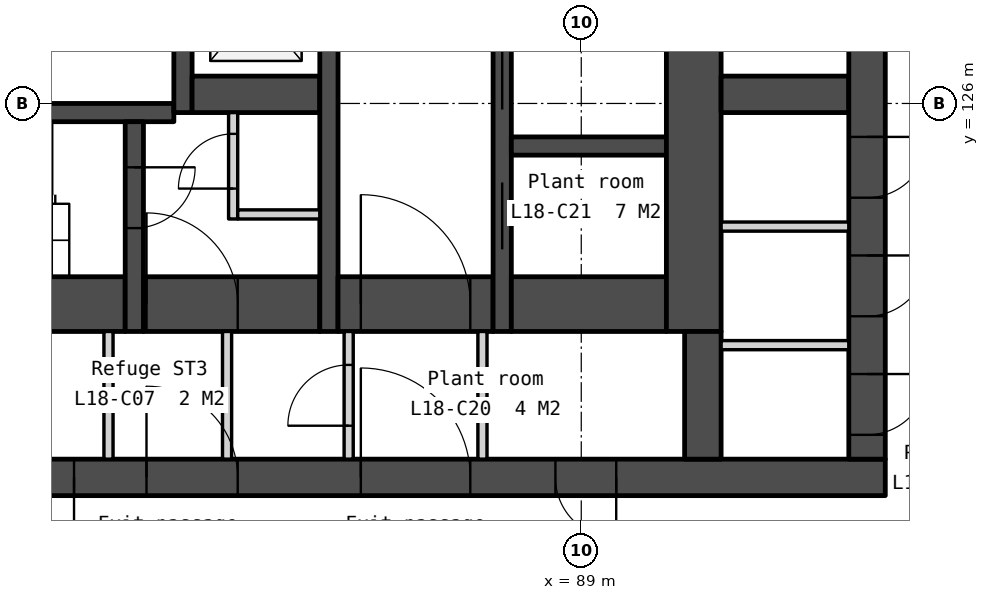
"""IFC4 building model, lengths in metres.
Left out: names, types, materials, properties, quantities, classifications, styles, units other than length and angle.
Written with IfcOpenShell. Run it as: python <this file> out.ifc"""

import sys

from ifc_helpers import new_model, si_unit, direction, frame, frame_2d, origin, place, context, subcontext, project, spatial, rectangle, extrude, element, fill, save


model = new_model("IFC4")
c1 = context("Model", 3, precision=1e-05, world=origin(), true_north=direction((0.0, 1.0)))
c2 = subcontext(c1, "Body", "Model", "MODEL_VIEW")
j1 = project(units=[si_unit("LENGTHUNIT", "METRE"), si_unit("PLANEANGLEUNIT", "RADIAN")], contexts=[c1])
p1 = place(None, origin())
s1 = spatial("IfcSite", under=j1, at=p1, CompositionType="ELEMENT")
p2 = place(p1, origin())
s2 = spatial("IfcBuilding", under=s1, at=p2, CompositionType="ELEMENT")
p3 = place(p2, frame((0.0, 0.0, 77.0)))
s3 = spatial("IfcBuildingStorey", under=s2, at=p3, CompositionType="ELEMENT", Elevation=77.0)
p4 = place(p3, frame((66.0, 119.85, 0.0), z_axis=(0.0, 0.0, 1.0), x_axis=(1.0, 0.0, 0.0)))
e1 = element("IfcWall", 1, at=p4, inside=s3, PredefinedType="SOLIDWALL", context=c2, shape_type="SweptSolid", body=[
    extrude(rectangle(XDim=28.0, YDim=0.6, at=frame_2d((14.0, 0.0))), origin(), (0.0, 0.0, 1.0), 4.35),
])
p5 = place(p4, frame((6.825, 0.0, 0.0)))
e2 = element("IfcOpeningElement", 2, at=p5, cuts=e1, PredefinedType="OPENING", context=c2, shape_type="SweptSolid", body=[
    extrude(rectangle(XDim=1.8, YDim=2.1, at=frame_2d((0.9, 1.05))), frame((0.0, 0.31, 0.0), z_axis=(0.0, -1.0, 0.0), x_axis=(1.0, 0.0, 0.0)), (0.0, 0.0, 1.0), 0.62),
])
p6 = place(p4, frame((15.85, 0.0, 0.0)))
e3 = element("IfcOpeningElement", 3, at=p6, cuts=e1, PredefinedType="OPENING", context=c2, shape_type="SweptSolid", body=[
    extrude(rectangle(XDim=1.5, YDim=2.1, at=frame_2d((0.75, 1.05))), frame((0.0, 0.31, 0.0), z_axis=(0.0, -1.0, 0.0), x_axis=(1.0, 0.0, 0.0)), (0.0, 0.0, 1.0), 0.62),
])
p7 = place(p4, frame((19.375, 0.0, 0.0)))
e4 = element("IfcOpeningElement", 4, at=p7, cuts=e1, PredefinedType="OPENING", context=c2, shape_type="SweptSolid", body=[
    extrude(rectangle(XDim=1.8, YDim=2.1, at=frame_2d((0.9, 1.05))), frame((0.0, 0.31, 0.0), z_axis=(0.0, -1.0, 0.0), x_axis=(1.0, 0.0, 0.0)), (0.0, 0.0, 1.0), 0.62),
])
p8 = place(p4, frame((4.425, 0.0, 0.0)))
e5 = element("IfcOpeningElement", 5, at=p8, cuts=e1, PredefinedType="OPENING", context=c2, shape_type="SweptSolid", body=[
    extrude(rectangle(XDim=1.0, YDim=2.1, at=frame_2d((0.5, 1.05))), frame((0.0, 0.31, 0.0), z_axis=(0.0, -1.0, 0.0), x_axis=(1.0, 0.0, 0.0)), (0.0, 0.0, 1.0), 0.62),
])
p9 = place(p4, frame((9.783, 0.0, 0.0)))
e6 = element("IfcOpeningElement", 6, at=p9, cuts=e1, PredefinedType="OPENING", context=c2, shape_type="SweptSolid", body=[
    extrude(rectangle(XDim=1.0, YDim=2.1, at=frame_2d((0.5, 1.05))), frame((0.0, 0.31, 0.0), z_axis=(0.0, -1.0, 0.0), x_axis=(1.0, 0.0, 0.0)), (0.0, 0.0, 1.0), 0.62),
])
p10 = place(p4, frame((11.525, 0.0, 0.0)))
e7 = element("IfcOpeningElement", 7, at=p10, cuts=e1, PredefinedType="OPENING", context=c2, shape_type="SweptSolid", body=[
    extrude(rectangle(XDim=1.0, YDim=2.1, at=frame_2d((0.5, 1.05))), frame((0.0, 0.31, 0.0), z_axis=(0.0, -1.0, 0.0), x_axis=(1.0, 0.0, 0.0)), (0.0, 0.0, 1.0), 0.62),
])
p11 = place(p4, frame((13.658, 0.0, 0.0)))
e8 = element("IfcOpeningElement", 8, at=p11, cuts=e1, PredefinedType="OPENING", context=c2, shape_type="SweptSolid", body=[
    extrude(rectangle(XDim=1.0, YDim=2.1, at=frame_2d((0.5, 1.05))), frame((0.0, 0.31, 0.0), z_axis=(0.0, -1.0, 0.0), x_axis=(1.0, 0.0, 0.0)), (0.0, 0.0, 1.0), 0.62),
])
p12 = place(p4, frame((22.575, 0.0, 0.0)))
e9 = element("IfcOpeningElement", 9, at=p12, cuts=e1, PredefinedType="OPENING", context=c2, shape_type="SweptSolid", body=[
    extrude(rectangle(XDim=1.0, YDim=2.1, at=frame_2d((0.5, 1.05))), frame((0.0, 0.31, 0.0), z_axis=(0.0, -1.0, 0.0), x_axis=(1.0, 0.0, 0.0)), (0.0, 0.0, 1.0), 0.62),
])
p13 = place(p3, frame((75.3, 122.7, 0.0), z_axis=(0.0, 0.0, 1.0), x_axis=(1.0, 0.0, 0.0)))
e10 = element("IfcWall", 10, at=p13, inside=s3, PredefinedType="SOLIDWALL", context=c2, shape_type="SweptSolid", body=[
    extrude(rectangle(XDim=6.2, YDim=0.9, at=frame_2d((3.1, 0.0))), origin(), (0.0, 0.0, 1.0), 4.35),
])
p14 = place(p3, frame((77.7, 125.85, 0.0), z_axis=(0.0, 0.0, 1.0), x_axis=(1.0, 0.0, 0.0)))
e11 = element("IfcWall", 11, at=p14, inside=s3, PredefinedType="SOLIDWALL", context=c2, shape_type="SweptSolid", body=[
    extrude(rectangle(XDim=4.6, YDim=0.3, at=frame_2d((2.3, 0.0))), origin(), (0.0, 0.0, 1.0), 4.35),
])
p15 = place(p3, frame((81.225, 122.25, 0.0), z_axis=(0.0, 0.0, 1.0), x_axis=(0.0, -1.0, 0.0)))
e12 = element("IfcWall", 12, at=p15, inside=s3, PredefinedType="PARTITIONING", context=c2, shape_type="SweptSolid", body=[
    extrude(rectangle(XDim=2.1, YDim=0.15, at=frame_2d((1.05, 0.0))), origin(), (0.0, 0.0, 1.0), 4.35),
])
p16 = place(p3, frame((81.65, 125.7, 0.0), z_axis=(0.0, 0.0, 1.0), x_axis=(0.0, -1.0, 0.0)))
e13 = element("IfcWall", 13, at=p16, inside=s3, PredefinedType="SOLIDWALL", context=c2, shape_type="SweptSolid", body=[
    extrude(rectangle(XDim=3.45, YDim=0.3, at=frame_2d((1.725, 0.0))), origin(), (0.0, 0.0, 1.0), 4.35),
])
p17 = place(p16, frame((0.75, 0.0, 0.0)))
e14 = element("IfcOpeningElement", 14, at=p17, cuts=e13, PredefinedType="OPENING", context=c2, shape_type="SweptSolid", body=[
    extrude(rectangle(XDim=1.0, YDim=2.1, at=frame_2d((0.5, 1.05))), frame((0.0, 0.16, 0.0), z_axis=(0.0, -1.0, 0.0), x_axis=(1.0, 0.0, 0.0)), (0.0, 0.0, 1.0), 0.32),
])
p18 = place(p3, frame((81.8, 122.7, 0.0), z_axis=(0.0, 0.0, 1.0), x_axis=(1.0, 0.0, 0.0)))
e15 = element("IfcWall", 15, at=p18, inside=s3, PredefinedType="SOLIDWALL", context=c2, shape_type="SweptSolid", body=[
    extrude(rectangle(XDim=2.9, YDim=0.9, at=frame_2d((1.45, 0.0))), origin(), (0.0, 0.0, 1.0), 4.35),
])
p19 = place(p18, frame((0.05, 0.0, 0.0)))
e16 = element("IfcOpeningElement", 16, at=p19, cuts=e15, PredefinedType="OPENING", context=c2, shape_type="SweptSolid", body=[
    extrude(rectangle(XDim=1.5, YDim=2.1, at=frame_2d((0.75, 1.05))), frame((0.0, 0.46, 0.0), z_axis=(0.0, -1.0, 0.0), x_axis=(1.0, 0.0, 0.0)), (0.0, 0.0, 1.0), 0.92),
])
p20 = place(p3, frame((82.45, 133.95, 0.0), z_axis=(0.0, 0.0, 1.0), x_axis=(0.0, -1.0, 0.0)))
e17 = element("IfcWall", 17, at=p20, inside=s3, PredefinedType="SOLIDWALL", context=c2, shape_type="SweptSolid", body=[
    extrude(rectangle(XDim=8.1, YDim=0.3, at=frame_2d((4.05, 0.0))), origin(), (0.0, 0.0, 1.0), 4.35),
])
p21 = place(p20, frame((0.6, 0.0, 0.0)))
e18 = element("IfcOpeningElement", 18, at=p21, cuts=e17, PredefinedType="OPENING", context=c2, shape_type="SweptSolid", body=[
    extrude(rectangle(XDim=1.1, YDim=2.1, at=frame_2d((0.55, 1.05))), frame((0.0, 0.16, 0.0), z_axis=(0.0, -1.0, 0.0), x_axis=(1.0, 0.0, 0.0)), (0.0, 0.0, 1.0), 0.32),
])
p22 = place(p20, frame((3.2, 0.0, 0.0)))
e19 = element("IfcOpeningElement", 19, at=p22, cuts=e17, PredefinedType="OPENING", context=c2, shape_type="SweptSolid", body=[
    extrude(rectangle(XDim=1.1, YDim=2.1, at=frame_2d((0.55, 1.05))), frame((0.0, 0.16, 0.0), z_axis=(0.0, -1.0, 0.0), x_axis=(1.0, 0.0, 0.0)), (0.0, 0.0, 1.0), 0.32),
])
p23 = place(p20, frame((5.8, 0.0, 0.0)))
e20 = element("IfcOpeningElement", 20, at=p23, cuts=e17, PredefinedType="OPENING", context=c2, shape_type="SweptSolid", body=[
    extrude(rectangle(XDim=1.1, YDim=2.1, at=frame_2d((0.55, 1.05))), frame((0.0, 0.16, 0.0), z_axis=(0.0, -1.0, 0.0), x_axis=(1.0, 0.0, 0.0)), (0.0, 0.0, 1.0), 0.32),
])
p24 = place(p3, frame((82.6, 126.15, 0.0), z_axis=(0.0, 0.0, 1.0), x_axis=(1.0, 0.0, 0.0)))
e21 = element("IfcWall", 21, at=p24, inside=s3, PredefinedType="SOLIDWALL", context=c2, shape_type="SweptSolid", body=[
    extrude(rectangle(XDim=2.1, YDim=0.6, at=frame_2d((1.05, 0.0))), origin(), (0.0, 0.0, 1.0), 4.35),
])
p25 = place(p3, frame((83.175, 122.25, 0.0), z_axis=(0.0, 0.0, 1.0), x_axis=(0.0, -1.0, 0.0)))
e22 = element("IfcWall", 22, at=p25, inside=s3, PredefinedType="PARTITIONING", context=c2, shape_type="SweptSolid", body=[
    extrude(rectangle(XDim=2.1, YDim=0.15, at=frame_2d((1.05, 0.0))), origin(), (0.0, 0.0, 1.0), 4.35),
])
p26 = place(p3, frame((83.275, 125.85, 0.0), z_axis=(0.0, 0.0, 1.0), x_axis=(0.0, -1.0, 0.0)))
e23 = element("IfcWall", 23, at=p26, inside=s3, PredefinedType="PARTITIONING", context=c2, shape_type="SweptSolid", body=[
    extrude(rectangle(XDim=1.75, YDim=0.15, at=frame_2d((0.875, 0.0))), origin(), (0.0, 0.0, 1.0), 4.35),
])
p27 = place(p26, frame((0.35, 0.0, 0.0)))
e24 = element("IfcOpeningElement", 24, at=p27, cuts=e23, PredefinedType="OPENING", context=c2, shape_type="SweptSolid", body=[
    extrude(rectangle(XDim=0.9, YDim=2.1, at=frame_2d((0.45, 1.05))), frame((0.0, 0.085, 0.0), z_axis=(0.0, -1.0, 0.0), x_axis=(1.0, 0.0, 0.0)), (0.0, 0.0, 1.0), 0.17),
])
p28 = place(p3, frame((83.35, 124.175, 0.0), z_axis=(0.0, 0.0, 1.0), x_axis=(1.0, 0.0, 0.0)))
e25 = element("IfcWall", 25, at=p28, inside=s3, PredefinedType="PARTITIONING", context=c2, shape_type="SweptSolid", body=[
    extrude(rectangle(XDim=1.35, YDim=0.15, at=frame_2d((0.675, 0.0))), origin(), (0.0, 0.0, 1.0), 4.35),
])
p29 = place(p3, frame((84.85, 133.95, 0.0), z_axis=(0.0, 0.0, 1.0), x_axis=(0.0, -1.0, 0.0)))
e26 = element("IfcWall", 26, at=p29, inside=s3, PredefinedType="SOLIDWALL", context=c2, shape_type="SweptSolid", body=[
    extrude(rectangle(XDim=11.7, YDim=0.3, at=frame_2d((5.85, 0.0))), origin(), (0.0, 0.0, 1.0), 4.35),
])
p30 = place(p3, frame((85.0, 122.7, 0.0), z_axis=(0.0, 0.0, 1.0), x_axis=(1.0, 0.0, 0.0)))
e27 = element("IfcWall", 27, at=p30, inside=s3, PredefinedType="SOLIDWALL", context=c2, shape_type="SweptSolid", body=[
    extrude(rectangle(XDim=2.55, YDim=0.9, at=frame_2d((1.275, 0.0))), origin(), (0.0, 0.0, 1.0), 4.35),
])
p31 = place(p30, frame((0.375, 0.0, 0.0)))
e28 = element("IfcOpeningElement", 28, at=p31, cuts=e27, PredefinedType="OPENING", context=c2, shape_type="SweptSolid", body=[
    extrude(rectangle(XDim=1.8, YDim=2.1, at=frame_2d((0.9, 1.05))), frame((0.0, 0.46, 0.0), z_axis=(0.0, -1.0, 0.0), x_axis=(1.0, 0.0, 0.0)), (0.0, 0.0, 1.0), 0.92),
])
p32 = place(p3, frame((85.175, 122.25, 0.0), z_axis=(0.0, 0.0, 1.0), x_axis=(0.0, -1.0, 0.0)))
e29 = element("IfcWall", 29, at=p32, inside=s3, PredefinedType="PARTITIONING", context=c2, shape_type="SweptSolid", body=[
    extrude(rectangle(XDim=2.1, YDim=0.15, at=frame_2d((1.05, 0.0))), origin(), (0.0, 0.0, 1.0), 4.35),
])
p33 = place(p32, frame((0.55, 0.0, 0.0)))
e30 = element("IfcOpeningElement", 30, at=p33, cuts=e29, PredefinedType="OPENING", context=c2, shape_type="SweptSolid", body=[
    extrude(rectangle(XDim=1.0, YDim=2.1, at=frame_2d((0.5, 1.05))), frame((0.0, 0.085, 0.0), z_axis=(0.0, -1.0, 0.0), x_axis=(1.0, 0.0, 0.0)), (0.0, 0.0, 1.0), 0.17),
])
p34 = place(p3, frame((87.375, 122.25, 0.0), z_axis=(0.0, 0.0, 1.0), x_axis=(0.0, -1.0, 0.0)))
e31 = element("IfcWall", 31, at=p34, inside=s3, PredefinedType="PARTITIONING", context=c2, shape_type="SweptSolid", body=[
    extrude(rectangle(XDim=2.1, YDim=0.15, at=frame_2d((1.05, 0.0))), origin(), (0.0, 0.0, 1.0), 4.35),
])
p35 = place(p3, frame((87.7, 133.95, 0.0), z_axis=(0.0, 0.0, 1.0), x_axis=(0.0, -1.0, 0.0)))
e32 = element("IfcWall", 32, at=p35, inside=s3, PredefinedType="SOLIDWALL", context=c2, shape_type="SweptSolid", body=[
    extrude(rectangle(XDim=11.7, YDim=0.3, at=frame_2d((5.85, 0.0))), origin(), (0.0, 0.0, 1.0), 4.35),
])
p36 = place(p35, frame((6.95, 0.0, 0.0)))
e33 = element("IfcOpeningElement", 33, at=p36, cuts=e32, PredefinedType="OPENING", context=c2, shape_type="SweptSolid", body=[
    extrude(rectangle(XDim=1.1, YDim=2.1, at=frame_2d((0.55, 1.05))), frame((0.0, 0.16, 0.0), z_axis=(0.0, -1.0, 0.0), x_axis=(1.0, 0.0, 0.0)), (0.0, 0.0, 1.0), 0.32),
])
p37 = place(p35, frame((5.1, 0.0, 0.0)))
e34 = element("IfcOpeningElement", 34, at=p37, cuts=e32, PredefinedType="OPENING", context=c2, shape_type="SweptSolid", body=[
    extrude(rectangle(XDim=1.0, YDim=2.1, at=frame_2d((0.5, 1.05))), frame((0.0, 0.16, 0.0), z_axis=(0.0, -1.0, 0.0), x_axis=(1.0, 0.0, 0.0)), (0.0, 0.0, 1.0), 0.32),
])
p38 = place(p35, frame((9.25, 0.0, 0.0)))
e35 = element("IfcOpeningElement", 35, at=p38, cuts=e32, PredefinedType="OPENING", context=c2, shape_type="SweptSolid", body=[
    extrude(rectangle(XDim=1.1, YDim=2.1, at=frame_2d((0.55, 1.05))), frame((0.0, 0.16, 0.0), z_axis=(0.0, -1.0, 0.0), x_axis=(1.0, 0.0, 0.0)), (0.0, 0.0, 1.0), 0.32),
])
p39 = place(p3, frame((87.85, 125.3, 0.0), z_axis=(0.0, 0.0, 1.0), x_axis=(1.0, 0.0, 0.0)))
e36 = element("IfcWall", 36, at=p39, inside=s3, PredefinedType="SOLIDWALL", context=c2, shape_type="SweptSolid", body=[
    extrude(rectangle(XDim=2.55, YDim=0.3, at=frame_2d((1.275, 0.0))), origin(), (0.0, 0.0, 1.0), 4.35),
])
p40 = place(p3, frame((87.85, 122.7, 0.0), z_axis=(0.0, 0.0, 1.0), x_axis=(1.0, 0.0, 0.0)))
e37 = element("IfcWall", 37, at=p40, inside=s3, PredefinedType="SOLIDWALL", context=c2, shape_type="SweptSolid", body=[
    extrude(rectangle(XDim=2.55, YDim=0.9, at=frame_2d((1.275, 0.0))), origin(), (0.0, 0.0, 1.0), 4.35),
])
p41 = place(p3, frame((90.85, 133.95, 0.0), z_axis=(0.0, 0.0, 1.0), x_axis=(0.0, -1.0, 0.0)))
e38 = element("IfcWall", 38, at=p41, inside=s3, PredefinedType="SOLIDWALL", context=c2, shape_type="SweptSolid", body=[
    extrude(rectangle(XDim=11.7, YDim=0.9, at=frame_2d((5.85, 0.0))), origin(), (0.0, 0.0, 1.0), 4.35),
])
p42 = place(p3, frame((91.0, 122.25, 0.0), z_axis=(0.0, 0.0, 1.0), x_axis=(0.0, -1.0, 0.0)))
e39 = element("IfcWall", 39, at=p42, inside=s3, PredefinedType="SOLIDWALL", context=c2, shape_type="SweptSolid", body=[
    extrude(rectangle(XDim=2.1, YDim=0.6, at=frame_2d((1.05, 0.0))), origin(), (0.0, 0.0, 1.0), 4.35),
])
p43 = place(p3, frame((91.3, 126.15, 0.0), z_axis=(0.0, 0.0, 1.0), x_axis=(1.0, 0.0, 0.0)))
e40 = element("IfcWall", 40, at=p43, inside=s3, PredefinedType="SOLIDWALL", context=c2, shape_type="SweptSolid", body=[
    extrude(rectangle(XDim=2.1, YDim=0.6, at=frame_2d((1.05, 0.0))), origin(), (0.0, 0.0, 1.0), 4.35),
])
for number, where, z_axis, x_axis in (
    (41, (91.3, 123.975, 0.0), (0.0, 0.0, 1.0), (1.0, 0.0, 0.0)),
    (42, (91.3, 122.025, 0.0), (0.0, 0.0, 1.0), (1.0, 0.0, 0.0)),
):
    element("IfcWall", number, at=place(p3, frame(where, z_axis=z_axis, x_axis=x_axis)), inside=s3, PredefinedType="PARTITIONING", context=c2, shape_type="SweptSolid", body=[
        extrude(rectangle(XDim=2.1, YDim=0.15, at=frame_2d((1.05, 0.0))), origin(), (0.0, 0.0, 1.0), 4.35),
    ])
p44 = place(p3, frame((93.7, 133.95, 0.0), z_axis=(0.0, 0.0, 1.0), x_axis=(0.0, -1.0, 0.0)))
e43 = element("IfcWall", 43, at=p44, inside=s3, PredefinedType="SOLIDWALL", context=c2, shape_type="SweptSolid", body=[
    extrude(rectangle(XDim=13.8, YDim=0.6, at=frame_2d((6.9, 0.0))), origin(), (0.0, 0.0, 1.0), 4.35),
])
p45 = place(p44, frame((0.6, 0.0, 0.0)))
e44 = element("IfcOpeningElement", 44, at=p45, cuts=e43, PredefinedType="OPENING", context=c2, shape_type="SweptSolid", body=[
    extrude(rectangle(XDim=1.1, YDim=2.1, at=frame_2d((0.55, 1.05))), frame((0.0, 0.31, 0.0), z_axis=(0.0, -1.0, 0.0), x_axis=(1.0, 0.0, 0.0)), (0.0, 0.0, 1.0), 0.62),
])
p46 = place(p44, frame((12.4, 0.0, 0.0)))
e45 = element("IfcOpeningElement", 45, at=p46, cuts=e43, PredefinedType="OPENING", context=c2, shape_type="SweptSolid", body=[
    extrude(rectangle(XDim=1.0, YDim=2.1, at=frame_2d((0.5, 1.05))), frame((0.0, 0.31, 0.0), z_axis=(0.0, -1.0, 0.0), x_axis=(1.0, 0.0, 0.0)), (0.0, 0.0, 1.0), 0.62),
])
p47 = place(p44, frame((8.5, 0.0, 0.0)))
e46 = element("IfcOpeningElement", 46, at=p47, cuts=e43, PredefinedType="OPENING", context=c2, shape_type="SweptSolid", body=[
    extrude(rectangle(XDim=1.0, YDim=2.1, at=frame_2d((0.5, 1.05))), frame((0.0, 0.31, 0.0), z_axis=(0.0, -1.0, 0.0), x_axis=(1.0, 0.0, 0.0)), (0.0, 0.0, 1.0), 0.62),
])
p48 = place(p44, frame((10.45, 0.0, 0.0)))
e47 = element("IfcOpeningElement", 47, at=p48, cuts=e43, PredefinedType="OPENING", context=c2, shape_type="SweptSolid", body=[
    extrude(rectangle(XDim=1.0, YDim=2.1, at=frame_2d((0.5, 1.05))), frame((0.0, 0.31, 0.0), z_axis=(0.0, -1.0, 0.0), x_axis=(1.0, 0.0, 0.0)), (0.0, 0.0, 1.0), 0.62),
])
p49 = place(p46, origin())
e48 = element("IfcDoor", 48, at=p49, inside=s3, OperationType="SINGLE_SWING_LEFT", PredefinedType="DOOR", context=c2, shape_type="SweptSolid", body=[
    extrude(rectangle(XDim=1.0, YDim=2.1, at=frame_2d((0.5, 1.05))), frame((0.0, 0.025, 0.0), z_axis=(0.0, -1.0, 0.0), x_axis=(1.0, 0.0, 0.0)), (0.0, 0.0, 1.0), 0.05),
])
fill(e45, e48)
p50 = place(p47, origin())
e49 = element("IfcDoor", 49, at=p50, inside=s3, OperationType="SINGLE_SWING_LEFT", PredefinedType="DOOR", context=c2, shape_type="SweptSolid", body=[
    extrude(rectangle(XDim=1.0, YDim=2.1, at=frame_2d((0.5, 1.05))), frame((0.0, 0.025, 0.0), z_axis=(0.0, -1.0, 0.0), x_axis=(1.0, 0.0, 0.0)), (0.0, 0.0, 1.0), 0.05),
])
fill(e46, e49)
p51 = place(p48, origin())
e50 = element("IfcDoor", 50, at=p51, inside=s3, OperationType="SINGLE_SWING_LEFT", PredefinedType="DOOR", context=c2, shape_type="SweptSolid", body=[
    extrude(rectangle(XDim=1.0, YDim=2.1, at=frame_2d((0.5, 1.05))), frame((0.0, 0.025, 0.0), z_axis=(0.0, -1.0, 0.0), x_axis=(1.0, 0.0, 0.0)), (0.0, 0.0, 1.0), 0.05),
])
fill(e47, e50)
p52 = place(p36, origin())
e51 = element("IfcDoor", 51, at=p52, inside=s3, OperationType="SLIDING_TO_LEFT", PredefinedType="DOOR", context=c2, shape_type="SweptSolid", body=[
    extrude(rectangle(XDim=1.1, YDim=2.1, at=frame_2d((0.55, 1.05))), frame((0.0, 0.025, 0.0), z_axis=(0.0, -1.0, 0.0), x_axis=(1.0, 0.0, 0.0)), (0.0, 0.0, 1.0), 0.05),
])
fill(e33, e51)
p53 = place(p31, origin())
e52 = element("IfcDoor", 52, at=p53, inside=s3, OperationType="DOUBLE_DOOR_DOUBLE_SWING", PredefinedType="DOOR", context=c2, shape_type="SweptSolid", body=[
    extrude(rectangle(XDim=1.8, YDim=2.1, at=frame_2d((0.9, 1.05))), frame((0.0, 0.025, 0.0), z_axis=(0.0, -1.0, 0.0), x_axis=(1.0, 0.0, 0.0)), (0.0, 0.0, 1.0), 0.05),
])
fill(e28, e52)
p54 = place(p19, origin())
e53 = element("IfcDoor", 53, at=p54, inside=s3, OperationType="DOUBLE_DOOR_DOUBLE_SWING", PredefinedType="DOOR", context=c2, shape_type="SweptSolid", body=[
    extrude(rectangle(XDim=1.5, YDim=2.1, at=frame_2d((0.75, 1.05))), frame((0.0, 0.025, 0.0), z_axis=(0.0, -1.0, 0.0), x_axis=(1.0, 0.0, 0.0)), (0.0, 0.0, 1.0), 0.05),
])
fill(e16, e53)
p55 = place(p6, origin())
e54 = element("IfcDoor", 54, at=p55, inside=s3, OperationType="DOUBLE_DOOR_DOUBLE_SWING", PredefinedType="DOOR", context=c2, shape_type="SweptSolid", body=[
    extrude(rectangle(XDim=1.5, YDim=2.1, at=frame_2d((0.75, 1.05))), frame((0.0, 0.025, 0.0), z_axis=(0.0, -1.0, 0.0), x_axis=(1.0, 0.0, 0.0)), (0.0, 0.0, 1.0), 0.05),
])
fill(e3, e54)
p56 = place(p7, origin())
e55 = element("IfcDoor", 55, at=p56, inside=s3, OperationType="DOUBLE_DOOR_DOUBLE_SWING", PredefinedType="DOOR", context=c2, shape_type="SweptSolid", body=[
    extrude(rectangle(XDim=1.8, YDim=2.1, at=frame_2d((0.9, 1.05))), frame((0.0, 0.025, 0.0), z_axis=(0.0, -1.0, 0.0), x_axis=(1.0, 0.0, 0.0)), (0.0, 0.0, 1.0), 0.05),
])
fill(e4, e55)
p57 = place(p27, origin())
e56 = element("IfcDoor", 56, at=p57, inside=s3, OperationType="SINGLE_SWING_RIGHT", PredefinedType="DOOR", context=c2, shape_type="SweptSolid", body=[
    extrude(rectangle(XDim=0.9, YDim=2.1, at=frame_2d((0.45, 1.05))), frame((0.0, 0.025, 0.0), z_axis=(0.0, -1.0, 0.0), x_axis=(1.0, 0.0, 0.0)), (0.0, 0.0, 1.0), 0.05),
])
fill(e24, e56)
p58 = place(p11, origin())
e57 = element("IfcDoor", 57, at=p58, inside=s3, OperationType="SINGLE_SWING_RIGHT", PredefinedType="DOOR", context=c2, shape_type="SweptSolid", body=[
    extrude(rectangle(XDim=1.0, YDim=2.1, at=frame_2d((0.5, 1.05))), frame((0.0, 0.025, 0.0), z_axis=(0.0, -1.0, 0.0), x_axis=(1.0, 0.0, 0.0)), (0.0, 0.0, 1.0), 0.05),
])
fill(e8, e57)
p59 = place(p33, origin())
e58 = element("IfcDoor", 58, at=p59, inside=s3, OperationType="SINGLE_SWING_RIGHT", PredefinedType="DOOR", context=c2, shape_type="SweptSolid", body=[
    extrude(rectangle(XDim=1.0, YDim=2.1, at=frame_2d((0.5, 1.05))), frame((0.0, 0.025, 0.0), z_axis=(0.0, -1.0, 0.0), x_axis=(1.0, 0.0, 0.0)), (0.0, 0.0, 1.0), 0.05),
])
fill(e30, e58)
p60 = place(p12, origin())
e59 = element("IfcDoor", 59, at=p60, inside=s3, OperationType="SINGLE_SWING_RIGHT", PredefinedType="DOOR", context=c2, shape_type="SweptSolid", body=[
    extrude(rectangle(XDim=1.0, YDim=2.1, at=frame_2d((0.5, 1.05))), frame((0.0, 0.025, 0.0), z_axis=(0.0, -1.0, 0.0), x_axis=(1.0, 0.0, 0.0)), (0.0, 0.0, 1.0), 0.05),
])
fill(e9, e59)
p61 = place(p17, origin())
e60 = element("IfcDoor", 60, at=p61, inside=s3, OperationType="SINGLE_SWING_LEFT", PredefinedType="DOOR", context=c2, shape_type="SweptSolid", body=[
    extrude(rectangle(XDim=1.0, YDim=2.1, at=frame_2d((0.5, 1.05))), frame((0.0, 0.025, 0.0), z_axis=(0.0, -1.0, 0.0), x_axis=(1.0, 0.0, 0.0)), (0.0, 0.0, 1.0), 0.05),
])
fill(e14, e60)
p62 = place(p38, origin())
e61 = element("IfcDoor", 61, at=p62, inside=s3, OperationType="SLIDING_TO_LEFT", PredefinedType="DOOR", context=c2, shape_type="SweptSolid", body=[
    extrude(rectangle(XDim=1.1, YDim=2.1, at=frame_2d((0.55, 1.05))), frame((0.0, 0.025, 0.0), z_axis=(0.0, -1.0, 0.0), x_axis=(1.0, 0.0, 0.0)), (0.0, 0.0, 1.0), 0.05),
])
fill(e35, e61)
save(model, sys.argv[1])
